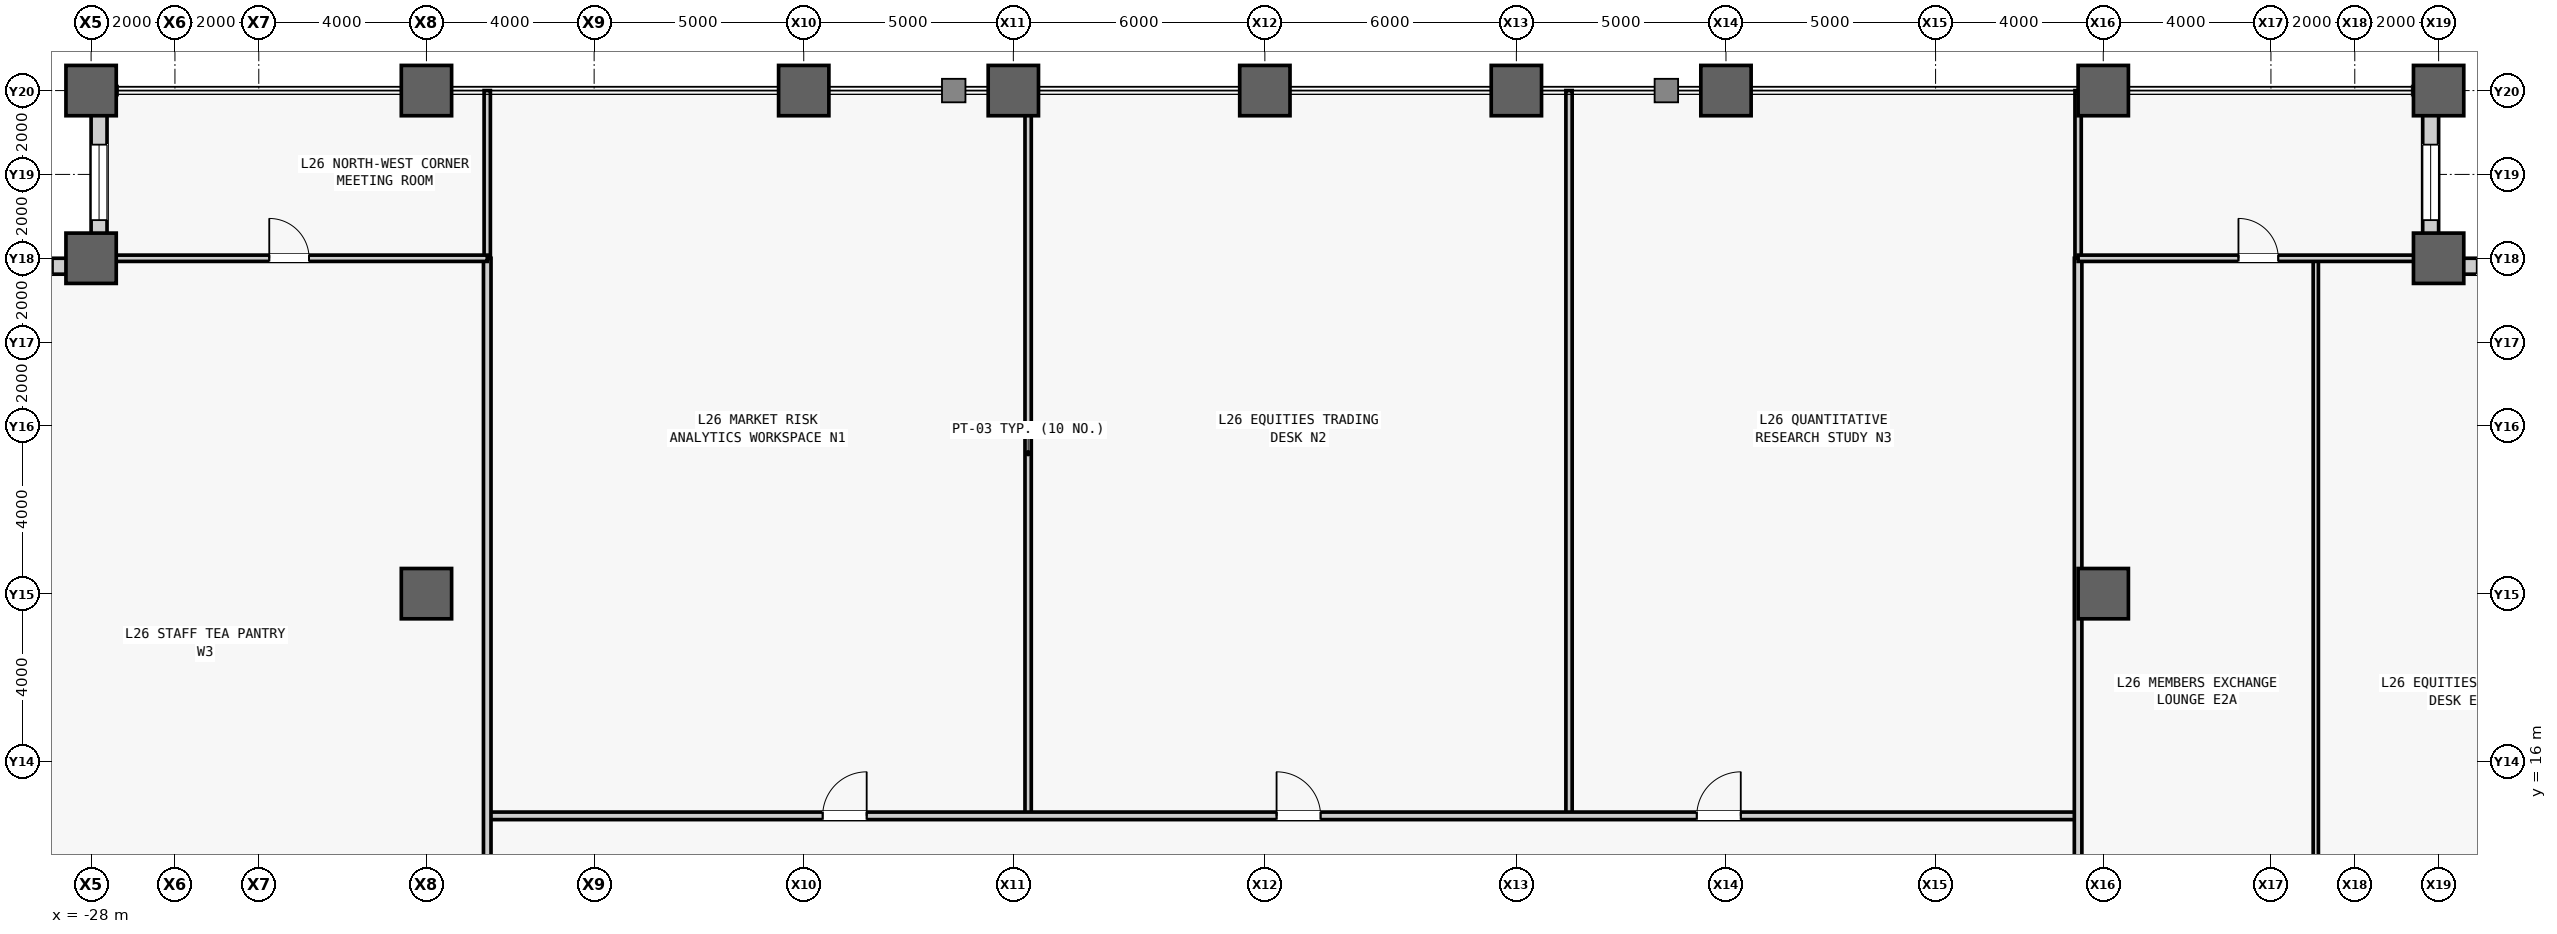
"""IFC4 building model, lengths in metres.
Left out: names, types, materials, properties, quantities, classifications, styles, units other than length and angle.
Written with IfcOpenShell. Run it as: python <this file> out.ifc"""

import sys

from ifc_helpers import new_model, si_unit, direction, frame, frame_2d, origin, origin_2d, place, context, subcontext, project, spatial, rectangle, hollow_rectangle, extrude, source, transform, mapped, element, fill, save


model = new_model("IFC4")
c1 = context("Model", 3, precision=1e-05, world=origin(), true_north=direction((0.0, 1.0)))
c2 = subcontext(c1, "Body", "Model", "MODEL_VIEW")
j1 = project(units=[si_unit("LENGTHUNIT", "METRE"), si_unit("PLANEANGLEUNIT", "RADIAN")], contexts=[c1])
p1 = place(None, origin())
s1 = spatial("IfcSite", under=j1, at=p1, CompositionType="ELEMENT")
p2 = place(p1, origin())
s2 = spatial("IfcBuilding", under=s1, at=p2, CompositionType="ELEMENT")
p3 = place(p2, frame((0.0, 0.0, 116.0)))
s3 = spatial("IfcBuildingStorey", under=s2, at=p3, CompositionType="ELEMENT", Elevation=116.0)
m1 = source(origin(), c2, "Body", "SweptSolid", [
    extrude(hollow_rectangle(XDim=1.2, YDim=1.2, WallThickness=0.07, at=origin_2d()), origin(), (0.0, 0.0, 1.0), 4.1),
])
for number, where, z_axis, x_axis in (
    (1, (-28.0, 28.0, 0.0), (0.0, 0.0, 1.0), (1.0, 0.0, 0.0)),
    (2, (-28.0, 32.0, 0.0), (0.0, 0.0, 1.0), (1.0, 0.0, 0.0)),
    (3, (-20.0, 20.0, 0.0), (0.0, 0.0, 1.0), (1.0, 0.0, 0.0)),
    (4, (-20.0, 32.0, 0.0), (0.0, 0.0, 1.0), (1.0, 0.0, 0.0)),
    (5, (-11.0, 32.0, 0.0), (0.0, 0.0, 1.0), (1.0, 0.0, 0.0)),
    (6, (-6.0, 32.0, 0.0), (0.0, 0.0, 1.0), (1.0, 0.0, 0.0)),
    (7, (0.0, 32.0, 0.0), (0.0, 0.0, 1.0), (1.0, 0.0, 0.0)),
    (8, (6.0, 32.0, 0.0), (0.0, 0.0, 1.0), (1.0, 0.0, 0.0)),
    (9, (11.0, 32.0, 0.0), (0.0, 0.0, 1.0), (1.0, 0.0, 0.0)),
    (10, (20.0, 20.0, 0.0), (0.0, 0.0, 1.0), (1.0, 0.0, 0.0)),
    (11, (20.0, 32.0, 0.0), (0.0, 0.0, 1.0), (1.0, 0.0, 0.0)),
    (12, (28.0, 28.0, 0.0), (0.0, 0.0, 1.0), (1.0, 0.0, 0.0)),
    (13, (28.0, 32.0, 0.0), (0.0, 0.0, 1.0), (1.0, 0.0, 0.0)),
):
    element("IfcColumn", number, at=place(p3, frame(where, z_axis=z_axis, x_axis=x_axis)), inside=s3, PredefinedType="COLUMN", context=c2, shape_type="MappedRepresentation", body=[
        mapped(m1, transform((0.0, 0.0, 0.0), scale=1.0)),
    ])
m2 = source(origin(), c2, "Body", "SweptSolid", [
    extrude(rectangle(XDim=3.62, YDim=0.38, at=frame_2d((1.81, 0.0))), origin(), (0.0, 0.0, 1.0), 3.145),
])
p4 = place(p3, frame((28.0, 27.81, 0.0), z_axis=(0.0, 0.0, 1.0), x_axis=(1.0, 0.0, 0.0)))
e14 = element("IfcWall", 14, at=p4, inside=s3, PredefinedType="STANDARD", context=c2, shape_type="MappedRepresentation", body=[
    mapped(m2, transform((0.0, 0.0, 0.0), scale=1.0)),
])
m3 = source(origin(), c2, "Body", "SweptSolid", [
    extrude(rectangle(XDim=1.8, YDim=2.4, at=frame_2d((0.9, 1.2))), frame((0.0, 0.2, 0.0), z_axis=(0.0, -1.0, 0.0), x_axis=(1.0, 0.0, 0.0)), (0.0, 0.0, 1.0), 0.4),
])
p5 = place(p4, frame((0.91, 0.0, 0.5)))
e15 = element("IfcOpeningElement", 15, at=p5, cuts=e14, PredefinedType="OPENING", context=c2, shape_type="MappedRepresentation", body=[
    mapped(m3, transform((0.0, 0.0, 0.0), scale=1.0)),
])
p6 = place(p3, frame((27.81, 28.0, 0.0), z_axis=(0.0, 0.0, 1.0), x_axis=(0.0, 1.0, 0.0)))
e16 = element("IfcWall", 16, at=p6, inside=s3, PredefinedType="STANDARD", context=c2, shape_type="MappedRepresentation", body=[
    mapped(m2, transform((0.0, 0.0, 0.0), scale=1.0)),
])
p7 = place(p6, frame((0.91, 0.0, 0.5)))
e17 = element("IfcOpeningElement", 17, at=p7, cuts=e16, PredefinedType="OPENING", context=c2, shape_type="MappedRepresentation", body=[
    mapped(m3, transform((0.0, 0.0, 0.0), scale=1.0)),
])
p8 = place(p3, frame((-27.81, 28.0, 0.0), z_axis=(0.0, 0.0, 1.0), x_axis=(0.0, 1.0, 0.0)))
e18 = element("IfcWall", 18, at=p8, inside=s3, PredefinedType="STANDARD", context=c2, shape_type="MappedRepresentation", body=[
    mapped(m2, transform((0.0, 0.0, 0.0), scale=1.0)),
])
p9 = place(p8, frame((0.91, 0.0, 0.5)))
e19 = element("IfcOpeningElement", 19, at=p9, cuts=e18, PredefinedType="OPENING", context=c2, shape_type="MappedRepresentation", body=[
    mapped(m3, transform((0.0, 0.0, 0.0), scale=1.0)),
])
p10 = place(p3, frame((-28.0, 27.81, 0.0), z_axis=(0.0, 0.0, 1.0), x_axis=(-1.0, 0.0, 0.0)))
e20 = element("IfcWall", 20, at=p10, inside=s3, PredefinedType="STANDARD", context=c2, shape_type="MappedRepresentation", body=[
    mapped(m2, transform((0.0, 0.0, 0.0), scale=1.0)),
])
p11 = place(p10, frame((0.91, 0.0, 0.5)))
e21 = element("IfcOpeningElement", 21, at=p11, cuts=e20, PredefinedType="OPENING", context=c2, shape_type="MappedRepresentation", body=[
    mapped(m3, transform((0.0, 0.0, 0.0), scale=1.0)),
])
m4 = source(origin(), c2, "Body", "SweptSolid", [
    extrude(rectangle(XDim=17.3, YDim=0.15, at=frame_2d((8.65, 0.0))), origin(), (0.0, 0.0, 1.0), 3.84),
])
for number, where, z_axis, x_axis in (
    (22, (-5.647, 14.7, 0.0), (0.0, 0.0, 1.0), (0.0, 1.0, 0.0)),
    (23, (7.256, 14.7, 0.0), (0.0, 0.0, 1.0), (0.0, 1.0, 0.0)),
):
    element("IfcWall", number, at=place(p3, frame(where, z_axis=z_axis, x_axis=x_axis)), inside=s3, PredefinedType="PARTITIONING", context=c2, shape_type="MappedRepresentation", body=[
        mapped(m4, transform((0.0, 0.0, 0.0), scale=1.0)),
    ])
m5 = source(origin(), c2, "Body", "SweptSolid", [
    extrude(rectangle(XDim=37.95, YDim=0.18, at=frame_2d((18.975, 0.0))), origin(), (0.0, 0.0, 1.0), 3.84),
])
p12 = place(p3, frame((-18.55, 14.7, 0.0), z_axis=(0.0, 0.0, 1.0), x_axis=(1.0, 0.0, 0.0)))
e24 = element("IfcWall", 24, at=p12, inside=s3, PredefinedType="PARTITIONING", context=c2, shape_type="MappedRepresentation", body=[
    mapped(m5, transform((0.0, 0.0, 0.0), scale=1.0)),
])
m6 = source(origin(), c2, "Body", "SweptSolid", [
    extrude(rectangle(XDim=1.05, YDim=2.2, at=frame_2d((0.525, 1.1))), frame((0.0, 0.1, 0.0), z_axis=(0.0, -1.0, 0.0), x_axis=(1.0, 0.0, 0.0)), (0.0, 0.0, 1.0), 0.2),
])
p13 = place(p12, frame((8.001, 0.0, 0.0)))
e25 = element("IfcOpeningElement", 25, at=p13, cuts=e24, PredefinedType="OPENING", context=c2, shape_type="MappedRepresentation", body=[
    mapped(m6, transform((0.0, 0.0, 0.0), scale=1.0)),
])
p14 = place(p12, frame((18.83, 0.0, 0.0)))
e26 = element("IfcOpeningElement", 26, at=p14, cuts=e24, PredefinedType="OPENING", context=c2, shape_type="MappedRepresentation", body=[
    mapped(m6, transform((0.0, 0.0, 0.0), scale=1.0)),
])
p15 = place(p12, frame((28.853, 0.0, 0.0)))
e27 = element("IfcOpeningElement", 27, at=p15, cuts=e24, PredefinedType="OPENING", context=c2, shape_type="MappedRepresentation", body=[
    mapped(m6, transform((0.0, 0.0, 0.0), scale=1.0)),
])
m7 = source(origin(), c2, "Body", "SweptSolid", [
    extrude(rectangle(XDim=4.0, YDim=0.15, at=frame_2d((2.0, 0.0))), origin(), (0.0, 0.0, 1.0), 3.84),
])
for number, where, z_axis, x_axis in (
    (28, (-18.55, 28.0, 0.0), (0.0, 0.0, 1.0), (0.0, 1.0, 0.0)),
    (29, (19.4, 28.0, 0.0), (0.0, 0.0, 1.0), (0.0, 1.0, 0.0)),
):
    element("IfcWall", number, at=place(p3, frame(where, z_axis=z_axis, x_axis=x_axis)), inside=s3, PredefinedType="PARTITIONING", context=c2, shape_type="MappedRepresentation", body=[
        mapped(m7, transform((0.0, 0.0, 0.0), scale=1.0)),
    ])
m8 = source(origin(), c2, "Body", "SweptSolid", [
    extrude(rectangle(XDim=56.0, YDim=0.18, at=frame_2d((28.0, 0.0))), origin(), (0.0, 0.0, 1.0), 3.84),
])
p16 = place(p3, frame((-18.55, -28.0, 0.0), z_axis=(0.0, 0.0, 1.0), x_axis=(0.0, 1.0, 0.0)))
e30 = element("IfcWall", 30, at=p16, inside=s3, PredefinedType="PARTITIONING", context=c2, shape_type="MappedRepresentation", body=[
    mapped(m8, transform((0.0, 0.0, 0.0), scale=1.0)),
])
m9 = source(origin(), c2, "Body", "SweptSolid", [
    extrude(rectangle(XDim=0.95, YDim=2.15, at=frame_2d((0.475, 1.075))), frame((0.0, 0.1, 0.0), z_axis=(0.0, -1.0, 0.0), x_axis=(1.0, 0.0, 0.0)), (0.0, 0.0, 1.0), 0.2),
])
p17 = place(p16, frame((18.002, 0.0, 0.0)))
e31 = element("IfcOpeningElement", 31, at=p17, cuts=e30, PredefinedType="OPENING", context=c2, shape_type="MappedRepresentation", body=[
    mapped(m9, transform((0.0, 0.0, 0.0), scale=1.0)),
])
p18 = place(p16, frame((26.935, 0.0, 0.0)))
e32 = element("IfcOpeningElement", 32, at=p18, cuts=e30, PredefinedType="OPENING", context=c2, shape_type="MappedRepresentation", body=[
    mapped(m9, transform((0.0, 0.0, 0.0), scale=1.0)),
])
p19 = place(p16, frame((36.732, 0.0, 0.0)))
e33 = element("IfcOpeningElement", 33, at=p19, cuts=e30, PredefinedType="OPENING", context=c2, shape_type="MappedRepresentation", body=[
    mapped(m9, transform((0.0, 0.0, 0.0), scale=1.0)),
])
m10 = source(origin(), c2, "Body", "SweptSolid", [
    extrude(rectangle(XDim=28.879, YDim=0.125, at=frame_2d((14.439, 0.0))), origin(), (0.0, 0.0, 1.0), 3.84),
])
p20 = place(p3, frame((25.07, -0.879, 0.0), z_axis=(0.0, 0.0, 1.0), x_axis=(0.0, 1.0, 0.0)))
e34 = element("IfcWall", 34, at=p20, inside=s3, PredefinedType="PARTITIONING", context=c2, shape_type="MappedRepresentation", body=[
    mapped(m10, transform((0.0, 0.0, 0.0), scale=1.0)),
])
m11 = source(origin(), c2, "Body", "SweptSolid", [
    extrude(rectangle(XDim=0.95, YDim=2.15, at=frame_2d((0.475, 1.075))), frame((0.0, 0.073, 0.0), z_axis=(0.0, -1.0, 0.0), x_axis=(1.0, 0.0, 0.0)), (0.0, 0.0, 1.0), 0.145),
])
p21 = place(p20, frame((7.314, 0.0, 0.0)))
e35 = element("IfcOpeningElement", 35, at=p21, cuts=e34, PredefinedType="OPENING", context=c2, shape_type="MappedRepresentation", body=[
    mapped(m11, transform((0.0, 0.0, 0.0), scale=1.0)),
])
m12 = source(origin(), c2, "Body", "SweptSolid", [
    extrude(rectangle(XDim=56.0, YDim=0.18, at=frame_2d((28.0, 0.0))), origin(), (0.0, 0.0, 1.0), 3.371),
])
p22 = place(p3, frame((19.4, -28.0, 0.0), z_axis=(0.0, 0.0, 1.0), x_axis=(0.0, 1.0, 0.0)))
e36 = element("IfcWall", 36, at=p22, inside=s3, PredefinedType="PARTITIONING", context=c2, shape_type="MappedRepresentation", body=[
    mapped(m12, transform((0.0, 0.0, 0.0), scale=1.0)),
])
p23 = place(p22, frame((20.311, 0.0, 0.0)))
e37 = element("IfcOpeningElement", 37, at=p23, cuts=e36, PredefinedType="OPENING", context=c2, shape_type="MappedRepresentation", body=[
    mapped(m9, transform((0.0, 0.0, 0.0), scale=1.0)),
])
p24 = place(p22, frame((34.135, 0.0, 0.0)))
e38 = element("IfcOpeningElement", 38, at=p24, cuts=e36, PredefinedType="OPENING", context=c2, shape_type="MappedRepresentation", body=[
    mapped(m9, transform((0.0, 0.0, 0.0), scale=1.0)),
])
m13 = source(origin(), c2, "Body", "SweptSolid", [
    extrude(rectangle(XDim=9.45, YDim=0.15, at=frame_2d((4.725, 0.0))), origin(), (0.0, 0.0, 1.0), 3.84),
])
p25 = place(p3, frame((-28.0, 28.0, 0.0), z_axis=(0.0, 0.0, 1.0), x_axis=(1.0, 0.0, 0.0)))
e39 = element("IfcWall", 39, at=p25, inside=s3, PredefinedType="PARTITIONING", context=c2, shape_type="MappedRepresentation", body=[
    mapped(m13, transform((0.0, 0.0, 0.0), scale=1.0)),
])
m14 = source(origin(), c2, "Body", "SweptSolid", [
    extrude(rectangle(XDim=0.95, YDim=2.15, at=frame_2d((0.475, 1.075))), frame((0.0, 0.085, 0.0), z_axis=(0.0, -1.0, 0.0), x_axis=(1.0, 0.0, 0.0)), (0.0, 0.0, 1.0), 0.17),
])
p26 = place(p25, frame((4.25, 0.0, 0.0)))
e40 = element("IfcOpeningElement", 40, at=p26, cuts=e39, PredefinedType="OPENING", context=c2, shape_type="MappedRepresentation", body=[
    mapped(m14, transform((0.0, 0.0, 0.0), scale=1.0)),
])
m15 = source(origin(), c2, "Body", "SweptSolid", [
    extrude(rectangle(XDim=8.6, YDim=0.15, at=frame_2d((4.3, 0.0))), origin(), (0.0, 0.0, 1.0), 3.84),
])
p27 = place(p3, frame((19.4, 28.0, 0.0), z_axis=(0.0, 0.0, 1.0), x_axis=(1.0, 0.0, 0.0)))
e41 = element("IfcWall", 41, at=p27, inside=s3, PredefinedType="PARTITIONING", context=c2, shape_type="MappedRepresentation", body=[
    mapped(m15, transform((0.0, 0.0, 0.0), scale=1.0)),
])
p28 = place(p27, frame((3.825, 0.0, 0.0)))
e42 = element("IfcOpeningElement", 42, at=p28, cuts=e41, PredefinedType="OPENING", context=c2, shape_type="MappedRepresentation", body=[
    mapped(m14, transform((0.0, 0.0, 0.0), scale=1.0)),
])
m16 = source(origin(), c2, "Body", "SweptSolid", [
    extrude(rectangle(XDim=1.8, YDim=2.4, at=frame_2d((0.9, 1.2))), frame((0.0, 0.03, 0.0), z_axis=(0.0, -1.0, 0.0), x_axis=(1.0, 0.0, 0.0)), (0.0, 0.0, 1.0), 0.06),
])
p29 = place(p5, origin())
e43 = element("IfcWindow", 43, at=p29, inside=s3, PartitioningType="SINGLE_PANEL", PredefinedType="WINDOW", context=c2, shape_type="MappedRepresentation", body=[
    mapped(m16, transform((0.0, 0.0, 0.0), scale=1.0)),
])
fill(e15, e43)
p30 = place(p7, origin())
e44 = element("IfcWindow", 44, at=p30, inside=s3, PartitioningType="SINGLE_PANEL", PredefinedType="WINDOW", context=c2, shape_type="MappedRepresentation", body=[
    mapped(m16, transform((0.0, 0.0, 0.0), scale=1.0)),
])
fill(e17, e44)
p31 = place(p9, origin())
e45 = element("IfcWindow", 45, at=p31, inside=s3, PartitioningType="SINGLE_PANEL", PredefinedType="WINDOW", context=c2, shape_type="MappedRepresentation", body=[
    mapped(m16, transform((0.0, 0.0, 0.0), scale=1.0)),
])
fill(e19, e45)
p32 = place(p11, origin())
e46 = element("IfcWindow", 46, at=p32, inside=s3, PartitioningType="SINGLE_PANEL", PredefinedType="WINDOW", context=c2, shape_type="MappedRepresentation", body=[
    mapped(m16, transform((0.0, 0.0, 0.0), scale=1.0)),
])
fill(e21, e46)
m17 = source(origin(), c2, "Body", "SweptSolid", [
    extrude(rectangle(XDim=1.05, YDim=2.2, at=frame_2d((0.525, 1.1))), frame((0.0, 0.025, 0.0), z_axis=(0.0, -1.0, 0.0), x_axis=(1.0, 0.0, 0.0)), (0.0, 0.0, 1.0), 0.05),
])
p33 = place(p13, origin())
e47 = element("IfcDoor", 47, at=p33, inside=s3, OperationType="SINGLE_SWING_RIGHT", PredefinedType="DOOR", context=c2, shape_type="MappedRepresentation", body=[
    mapped(m17, transform((0.0, 0.0, 0.0), scale=1.0)),
])
fill(e25, e47)
p34 = place(p14, origin())
e48 = element("IfcDoor", 48, at=p34, inside=s3, OperationType="SINGLE_SWING_LEFT", PredefinedType="DOOR", context=c2, shape_type="MappedRepresentation", body=[
    mapped(m17, transform((0.0, 0.0, 0.0), scale=1.0)),
])
fill(e26, e48)
p35 = place(p15, origin())
e49 = element("IfcDoor", 49, at=p35, inside=s3, OperationType="SINGLE_SWING_RIGHT", PredefinedType="DOOR", context=c2, shape_type="MappedRepresentation", body=[
    mapped(m17, transform((0.0, 0.0, 0.0), scale=1.0)),
])
fill(e27, e49)
m18 = source(origin(), c2, "Body", "SweptSolid", [
    extrude(rectangle(XDim=0.95, YDim=2.15, at=frame_2d((0.475, 1.075))), frame((0.0, 0.025, 0.0), z_axis=(0.0, -1.0, 0.0), x_axis=(1.0, 0.0, 0.0)), (0.0, 0.0, 1.0), 0.05),
])
p36 = place(p26, origin())
e50 = element("IfcDoor", 50, at=p36, inside=s3, OperationType="SINGLE_SWING_LEFT", PredefinedType="DOOR", context=c2, shape_type="MappedRepresentation", body=[
    mapped(m18, transform((0.0, 0.0, 0.0), scale=1.0)),
])
fill(e40, e50)
p37 = place(p28, origin())
e51 = element("IfcDoor", 51, at=p37, inside=s3, OperationType="SINGLE_SWING_LEFT", PredefinedType="DOOR", context=c2, shape_type="MappedRepresentation", body=[
    mapped(m18, transform((0.0, 0.0, 0.0), scale=1.0)),
])
fill(e42, e51)
save(model, sys.argv[1])
